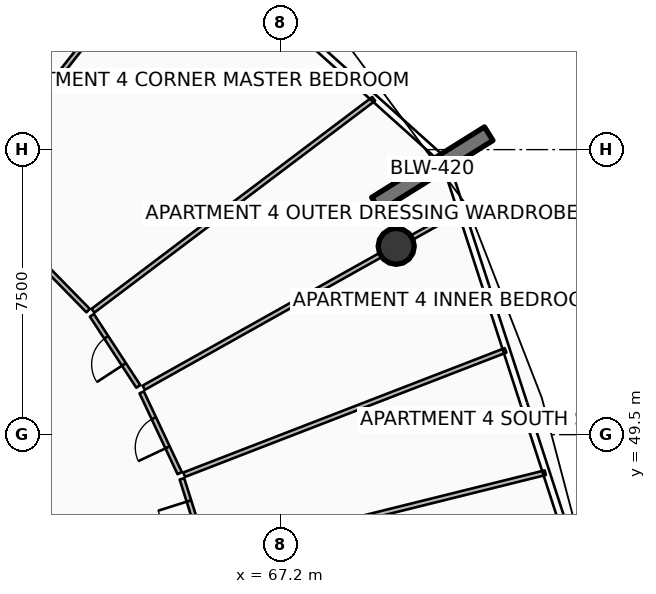
"""IFC4 building model, lengths in metres.
Left out: names, types, materials, properties, quantities, classifications, styles, units other than length and angle.
Written with IfcOpenShell. Run it as: python <this file> out.ifc"""

import sys

from ifc_helpers import new_model, si_unit, direction, frame, frame_2d, origin, origin_2d, place, context, subcontext, project, spatial, rectangle, circle, extrude, element, fill, save


model = new_model("IFC4")
c1 = context("Model", 3, precision=1e-05, world=origin(), true_north=direction((0.0, 1.0)))
c2 = subcontext(c1, "Body", "Model", "MODEL_VIEW")
j1 = project(units=[si_unit("LENGTHUNIT", "METRE"), si_unit("PLANEANGLEUNIT", "RADIAN")], contexts=[c1])
p1 = place(None, origin())
s1 = spatial("IfcSite", under=j1, at=p1, CompositionType="ELEMENT")
p2 = place(p1, origin())
s2 = spatial("IfcBuilding", under=s1, at=p2, CompositionType="ELEMENT")
p3 = place(p2, frame((0.0, 0.0, 309.85)))
s3 = spatial("IfcBuildingStorey", under=s2, at=p3, CompositionType="ELEMENT", Elevation=309.85)
p4 = place(p3, frame((69.707, 55.564, 0.0), z_axis=(0.0, 0.0, 1.0), x_axis=(0.848053161125, 0.529911158502, 0.0)))
e1 = element("IfcWall", 1, at=p4, inside=s3, PredefinedType="SOLIDWALL", context=c2, shape_type="SweptSolid", body=[
    extrude(rectangle(XDim=3.5, YDim=0.42, at=frame_2d((1.75, 0.0))), origin(), (0.0, 0.0, 1.0), 3.85),
])
p5 = place(p3, frame((70.242, 54.456, 0.0), z_axis=(-0.31032645066, -0.173748419839, 0.934617023504), x_axis=(0.488529751374, -0.872547237703, 0.0)))
e2 = element("IfcColumn", 2, at=p5, inside=s3, PredefinedType="COLUMN", context=c2, shape_type="SweptSolid", body=[
    extrude(circle(Radius=0.475, at=origin_2d()), origin(), (0.0, 0.0, 1.0), 3.691),
])
p6 = place(p3, frame((65.339, 46.307, 0.0), z_axis=(0.0, 0.0, 1.0), x_axis=(0.970504630961, 0.241082478175, 0.0)))
e3 = element("IfcWall", 3, at=p6, inside=s3, PredefinedType="PARTITIONING", context=c2, shape_type="SweptSolid", body=[
    extrude(rectangle(XDim=9.094, YDim=0.125, at=frame_2d((4.547, 0.0))), origin(), (0.0, 0.0, 1.0), 2.425),
])
p7 = place(p3, frame((64.663, 48.446, 0.0), z_axis=(0.0, 0.0, 1.0), x_axis=(0.932642933348, 0.360800719062, 0.0)))
e4 = element("IfcWall", 4, at=p7, inside=s3, PredefinedType="PARTITIONING", context=c2, shape_type="SweptSolid", body=[
    extrude(rectangle(XDim=9.067, YDim=0.125, at=frame_2d((4.534, 0.0))), origin(), (0.0, 0.0, 1.0), 2.425),
])
p8 = place(p3, frame((65.228, 46.362, 0.0), z_axis=(0.0, 0.0, 1.0), x_axis=(-0.301520440564, 0.953459712795, 0.0)))
e5 = element("IfcWall", 5, at=p8, inside=s3, PredefinedType="PARTITIONING", context=c2, shape_type="SweptSolid", body=[
    extrude(rectangle(XDim=2.072, YDim=0.125, at=frame_2d((1.036, 0.0))), origin(), (0.0, 0.0, 1.0), 2.89),
])
p9 = place(p8, frame((0.611, 0.0, 0.0)))
e6 = element("IfcOpeningElement", 6, at=p9, cuts=e5, PredefinedType="OPENING", context=c2, shape_type="SweptSolid", body=[
    extrude(rectangle(XDim=0.85, YDim=2.06, at=frame_2d((0.425, 1.03))), frame((0.0, 0.073, 0.0), z_axis=(0.0, -1.0, 0.0), x_axis=(1.0, 0.0, 0.0)), (0.0, 0.0, 1.0), 0.145),
])
p10 = place(p3, frame((64.544, 48.486, 0.0), z_axis=(0.0, 0.0, 1.0), x_axis=(-0.425692004013, 0.904868121728, 0.0)))
e7 = element("IfcWall", 7, at=p10, inside=s3, PredefinedType="PARTITIONING", context=c2, shape_type="SweptSolid", body=[
    extrude(rectangle(XDim=2.351, YDim=0.125, at=frame_2d((1.175, 0.0))), origin(), (0.0, 0.0, 1.0), 2.407),
])
p11 = place(p10, frame((0.75, 0.0, 0.0)))
e8 = element("IfcOpeningElement", 8, at=p11, cuts=e7, PredefinedType="OPENING", context=c2, shape_type="SweptSolid", body=[
    extrude(rectangle(XDim=0.85, YDim=2.06, at=frame_2d((0.425, 1.03))), frame((0.0, 0.073, 0.0), z_axis=(0.0, -1.0, 0.0), x_axis=(1.0, 0.0, 0.0)), (0.0, 0.0, 1.0), 0.145),
])
p12 = place(p3, frame((63.597, 50.735, 0.0), z_axis=(0.0, 0.0, 1.0), x_axis=(0.872500345179, 0.48861349517, 0.0)))
e9 = element("IfcWall", 9, at=p12, inside=s3, PredefinedType="PARTITIONING", context=c2, shape_type="SweptSolid", body=[
    extrude(rectangle(XDim=9.544, YDim=0.125, at=frame_2d((4.772, 0.0))), origin(), (0.0, 0.0, 1.0), 2.407),
])
p13 = place(p3, frame((62.262, 52.761, 0.0), z_axis=(0.0, 0.0, 1.0), x_axis=(0.798277470684, 0.602289863603, 0.0)))
e10 = element("IfcWall", 10, at=p13, inside=s3, PredefinedType="PARTITIONING", context=c2, shape_type="SweptSolid", body=[
    extrude(rectangle(XDim=9.253, YDim=0.125, at=frame_2d((4.626, 0.0))), origin(), (0.0, 0.0, 1.0), 2.425),
])
p14 = place(p3, frame((63.455, 50.769, 0.0), z_axis=(0.0, 0.0, 1.0), x_axis=(-0.546754496642, 0.837292971666, 0.0)))
e11 = element("IfcWall", 11, at=p14, inside=s3, PredefinedType="PARTITIONING", context=c2, shape_type="SweptSolid", body=[
    extrude(rectangle(XDim=2.234, YDim=0.125, at=frame_2d((1.117, 0.0))), origin(), (0.0, 0.0, 1.0), 2.407),
])
p15 = place(p14, frame((0.692, 0.0, 0.0)))
e12 = element("IfcOpeningElement", 12, at=p15, cuts=e11, PredefinedType="OPENING", context=c2, shape_type="SweptSolid", body=[
    extrude(rectangle(XDim=0.85, YDim=2.06, at=frame_2d((0.425, 1.03))), frame((0.0, 0.073, 0.0), z_axis=(0.0, -1.0, 0.0), x_axis=(1.0, 0.0, 0.0)), (0.0, 0.0, 1.0), 0.145),
])
p16 = place(p3, frame((62.134, 52.764, 0.0), z_axis=(0.0, 0.0, 1.0), x_axis=(-0.699585598454, 0.714548801997, 0.0)))
e13 = element("IfcWall", 13, at=p16, inside=s3, PredefinedType="PARTITIONING", context=c2, shape_type="SweptSolid", body=[
    extrude(rectangle(XDim=4.373, YDim=0.125, at=frame_2d((2.187, 0.0))), origin(), (0.0, 0.0, 1.0), 2.407),
])
p17 = place(p16, frame((1.736, 0.0, 0.0)))
e14 = element("IfcOpeningElement", 14, at=p17, cuts=e13, PredefinedType="OPENING", context=c2, shape_type="SweptSolid", body=[
    extrude(rectangle(XDim=0.9, YDim=2.08, at=frame_2d((0.45, 1.04))), frame((0.0, 0.073, 0.0), z_axis=(0.0, -1.0, 0.0), x_axis=(1.0, 0.0, 0.0)), (0.0, 0.0, 1.0), 0.145),
])
p18 = place(p3, frame((59.067, 56.038, 0.0), z_axis=(0.0, 0.0, 1.0), x_axis=(0.619108431237, 0.785305514034, 0.0)))
e15 = element("IfcWall", 15, at=p18, inside=s3, PredefinedType="PARTITIONING", context=c2, shape_type="SweptSolid", body=[
    extrude(rectangle(XDim=8.792, YDim=0.125, at=frame_2d((4.396, 0.0))), origin(), (0.0, 0.0, 1.0), 2.407),
])
p19 = place(p9, origin())
e16 = element("IfcDoor", 16, at=p19, inside=s3, OperationType="SINGLE_SWING_RIGHT", PredefinedType="DOOR", context=c2, shape_type="SweptSolid", body=[
    extrude(rectangle(XDim=0.85, YDim=2.06, at=frame_2d((0.425, 1.03))), frame((0.0, 0.025, 0.0), z_axis=(0.0, -1.0, 0.0), x_axis=(1.0, 0.0, 0.0)), (0.0, 0.0, 1.0), 0.05),
])
fill(e6, e16)
p20 = place(p11, origin())
e17 = element("IfcDoor", 17, at=p20, inside=s3, OperationType="SINGLE_SWING_LEFT", PredefinedType="DOOR", context=c2, shape_type="SweptSolid", body=[
    extrude(rectangle(XDim=0.85, YDim=2.06, at=frame_2d((0.425, 1.03))), frame((0.0, 0.025, 0.0), z_axis=(0.0, -1.0, 0.0), x_axis=(1.0, 0.0, 0.0)), (0.0, 0.0, 1.0), 0.05),
])
fill(e8, e17)
p21 = place(p15, origin())
e18 = element("IfcDoor", 18, at=p21, inside=s3, OperationType="SINGLE_SWING_LEFT", PredefinedType="DOOR", context=c2, shape_type="SweptSolid", body=[
    extrude(rectangle(XDim=0.85, YDim=2.06, at=frame_2d((0.425, 1.03))), frame((0.0, 0.025, 0.0), z_axis=(0.0, -1.0, 0.0), x_axis=(1.0, 0.0, 0.0)), (0.0, 0.0, 1.0), 0.05),
])
fill(e12, e18)
save(model, sys.argv[1])
